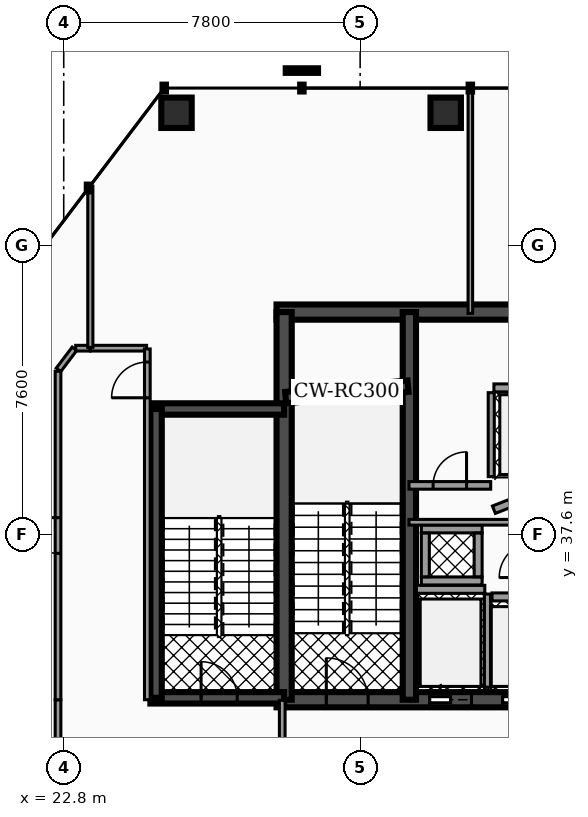
"""IFC4 building model, lengths in metres.
Left out: names, types, materials, properties, quantities, classifications, styles, units other than length and angle.
Written with IfcOpenShell. Run it as: python <this file> out.ifc"""

import sys

from ifc_helpers import new_model, si_unit, direction, frame, frame_2d, origin, origin_2d, place, context, subcontext, project, spatial, rectangle, hollow_rectangle, extrude, element, fill, save


model = new_model("IFC4")
c1 = context("Model", 3, precision=1e-05, world=origin(), true_north=direction((0.0, 1.0)))
c2 = subcontext(c1, "Body", "Model", "MODEL_VIEW")
j1 = project(units=[si_unit("LENGTHUNIT", "METRE"), si_unit("PLANEANGLEUNIT", "RADIAN")], contexts=[c1])
p1 = place(None, origin())
s1 = spatial("IfcSite", under=j1, at=p1, CompositionType="ELEMENT")
p2 = place(p1, origin())
s2 = spatial("IfcBuilding", under=s1, at=p2, CompositionType="ELEMENT")
p3 = place(p2, frame((0.0, 0.0, 119.0)))
s3 = spatial("IfcBuildingStorey", under=s2, at=p3, CompositionType="ELEMENT", Elevation=119.0)
p4 = place(p3, frame((28.4, 43.45, 0.0), z_axis=(0.0, 0.0, 1.0), x_axis=(1.0, 0.0, 0.0)))
e1 = element("IfcWall", 1, at=p4, inside=s3, PredefinedType="SHEAR", context=c2, shape_type="SweptSolid", body=[
    extrude(rectangle(XDim=20.06, YDim=0.4, at=frame_2d((10.03, 0.0))), origin(), (0.0, 0.0, 1.0), 4.18),
])
p5 = place(p3, frame((28.4, 33.25, 0.0), z_axis=(0.0, 0.0, 1.0), x_axis=(1.0, 0.0, 0.0)))
e2 = element("IfcWall", 2, at=p5, inside=s3, PredefinedType="SHEAR", context=c2, shape_type="SweptSolid", body=[
    extrude(rectangle(XDim=20.06, YDim=0.4, at=frame_2d((10.03, 0.0))), origin(), (0.0, 0.0, 1.0), 4.18),
])
p6 = place(p5, frame((4.03, 0.0, 0.0)))
e3 = element("IfcOpeningElement", 3, at=p6, cuts=e2, PredefinedType="OPENING", context=c2, shape_type="SweptSolid", body=[
    extrude(rectangle(XDim=1.1, YDim=2.15, at=frame_2d((0.55, 1.075))), frame((0.0, 0.21, 0.0), z_axis=(0.0, -1.0, 0.0), x_axis=(1.0, 0.0, 0.0)), (0.0, 0.0, 1.0), 0.42),
])
p7 = place(p5, frame((14.87, 0.0, 0.0)))
e4 = element("IfcOpeningElement", 4, at=p7, cuts=e2, PredefinedType="OPENING", context=c2, shape_type="SweptSolid", body=[
    extrude(rectangle(XDim=1.1, YDim=2.15, at=frame_2d((0.55, 1.075))), frame((0.0, 0.21, 0.0), z_axis=(0.0, -1.0, 0.0), x_axis=(1.0, 0.0, 0.0)), (0.0, 0.0, 1.0), 0.42),
])
p8 = place(p5, frame((5.95, 0.0, 0.0)))
e5 = element("IfcOpeningElement", 5, at=p8, cuts=e2, PredefinedType="OPENING", context=c2, shape_type="SweptSolid", body=[
    extrude(rectangle(XDim=1.0, YDim=2.1, at=frame_2d((0.5, 1.05))), frame((0.0, 0.21, 0.0), z_axis=(0.0, -1.0, 0.0), x_axis=(1.0, 0.0, 0.0)), (0.0, 0.0, 1.0), 0.42),
])
p9 = place(p5, frame((7.65, 0.0, 0.0)))
e6 = element("IfcOpeningElement", 6, at=p9, cuts=e2, PredefinedType="OPENING", context=c2, shape_type="SweptSolid", body=[
    extrude(rectangle(XDim=1.0, YDim=2.1, at=frame_2d((0.5, 1.05))), frame((0.0, 0.21, 0.0), z_axis=(0.0, -1.0, 0.0), x_axis=(1.0, 0.0, 0.0)), (0.0, 0.0, 1.0), 0.42),
])
p10 = place(p5, frame((1.31, 0.0, 0.0)))
e7 = element("IfcOpeningElement", 7, at=p10, cuts=e2, PredefinedType="OPENING", context=c2, shape_type="SweptSolid", body=[
    extrude(rectangle(XDim=1.1, YDim=2.2, at=frame_2d((0.55, 1.1))), frame((0.0, 0.21, 0.0), z_axis=(0.0, -1.0, 0.0), x_axis=(1.0, 0.0, 0.0)), (0.0, 0.0, 1.0), 0.42),
])
p11 = place(p5, frame((9.44, 0.0, 0.0)))
e8 = element("IfcOpeningElement", 8, at=p11, cuts=e2, PredefinedType="OPENING", context=c2, shape_type="SweptSolid", body=[
    extrude(rectangle(XDim=1.12, YDim=2.05, at=frame_2d((0.56, 1.025))), frame((0.0, 0.21, 0.0), z_axis=(0.0, -1.0, 0.0), x_axis=(1.0, 0.0, 0.0)), (0.0, 0.0, 1.0), 0.42),
])
p12 = place(p5, frame((17.65, 0.0, 0.0)))
e9 = element("IfcOpeningElement", 9, at=p12, cuts=e2, PredefinedType="OPENING", context=c2, shape_type="SweptSolid", body=[
    extrude(rectangle(XDim=1.1, YDim=2.2, at=frame_2d((0.55, 1.1))), frame((0.0, 0.21, 0.0), z_axis=(0.0, -1.0, 0.0), x_axis=(1.0, 0.0, 0.0)), (0.0, 0.0, 1.0), 0.42),
])
p13 = place(p3, frame((28.6, 33.25, 0.0), z_axis=(0.0, 0.0, 1.0), x_axis=(0.0, 1.0, 0.0)))
e10 = element("IfcWall", 10, at=p13, inside=s3, PredefinedType="SHEAR", context=c2, shape_type="SweptSolid", body=[
    extrude(rectangle(XDim=10.2, YDim=0.4, at=frame_2d((5.1, 0.0))), origin(), (0.0, 0.0, 1.0), 4.18),
])
p14 = place(p3, frame((31.895, 33.25, 0.0), z_axis=(0.0, 0.0, 1.0), x_axis=(0.0, 1.0, 0.0)))
e11 = element("IfcWall", 11, at=p14, inside=s3, PredefinedType="SHEAR", context=c2, shape_type="SweptSolid", body=[
    extrude(rectangle(XDim=10.2, YDim=0.35, at=frame_2d((5.1, 0.0))), origin(), (0.0, 0.0, 1.0), 4.18),
])
p15 = place(p3, frame((28.64, 41.2, 0.0), z_axis=(0.0, 0.0, 1.0), x_axis=(0.995687118776, 0.092774789157, 0.0)))
e12 = element("IfcWall", 12, at=p15, inside=s3, PredefinedType="SHEAR", context=c2, shape_type="SweptSolid", body=[
    extrude(rectangle(XDim=3.234, YDim=0.3, at=frame_2d((1.617, 0.0))), origin(), (0.0, 0.0, 1.0), 4.18),
])
p16 = place(p3, frame((25.08, 40.9, 0.0), z_axis=(0.0, 0.0, 1.0), x_axis=(1.0, 0.0, 0.0)))
e13 = element("IfcWall", 13, at=p16, inside=s3, PredefinedType="SHEAR", context=c2, shape_type="SweptSolid", body=[
    extrude(rectangle(XDim=3.52, YDim=0.3, at=frame_2d((1.76, 0.0))), origin(), (0.0, 0.0, 1.0), 4.18),
])
p17 = place(p3, frame((25.08, 33.3, 0.0), z_axis=(0.0, 0.0, 1.0), x_axis=(1.0, 0.0, 0.0)))
e14 = element("IfcWall", 14, at=p17, inside=s3, PredefinedType="SHEAR", context=c2, shape_type="SweptSolid", body=[
    extrude(rectangle(XDim=3.52, YDim=0.3, at=frame_2d((1.76, 0.0))), origin(), (0.0, 0.0, 1.0), 4.18),
])
p18 = place(p17, frame((1.335, 0.0, 0.0)))
e15 = element("IfcOpeningElement", 15, at=p18, cuts=e14, PredefinedType="OPENING", context=c2, shape_type="SweptSolid", body=[
    extrude(rectangle(XDim=0.95, YDim=2.2, at=frame_2d((0.475, 1.1))), frame((0.0, 0.16, 0.0), z_axis=(0.0, -1.0, 0.0), x_axis=(1.0, 0.0, 0.0)), (0.0, 0.0, 1.0), 0.32),
])
p19 = place(p3, frame((25.23, 33.3, 0.0), z_axis=(0.0, 0.0, 1.0), x_axis=(0.0, 1.0, 0.0)))
e16 = element("IfcWall", 16, at=p19, inside=s3, PredefinedType="SHEAR", context=c2, shape_type="SweptSolid", body=[
    extrude(rectangle(XDim=7.6, YDim=0.3, at=frame_2d((3.8, 0.0))), origin(), (0.0, 0.0, 1.0), 4.18),
])
p20 = place(p3, frame((32.851, 48.694, 0.0), z_axis=(-0.044280402456, -0.018552263479, 0.998846864879), x_axis=(0.386426625093, -0.922320152344, 0.0)))
e17 = element("IfcColumn", 17, at=p20, inside=s3, PredefinedType="COLUMN", context=c2, shape_type="SweptSolid", body=[
    extrude(hollow_rectangle(XDim=0.8, YDim=0.8, WallThickness=0.04, at=origin_2d()), origin(), (0.0, 0.0, 1.0), 4.185),
])
p21 = place(p3, frame((25.767, 48.694, 0.0), z_axis=(-0.083623610974, -0.018505433744, 0.996325569585), x_axis=(0.216067063964, -0.976378524892, 0.0)))
e18 = element("IfcColumn", 18, at=p21, inside=s3, PredefinedType="COLUMN", context=c2, shape_type="SweptSolid", body=[
    extrude(hollow_rectangle(XDim=0.8, YDim=0.8, WallThickness=0.04, at=origin_2d()), origin(), (0.0, 0.0, 1.0), 4.195),
])
p22 = place(p3, frame((32.08, 36.155, 0.0), z_axis=(0.0, 0.0, 1.0), x_axis=(1.0, 0.0, 0.0)))
e19 = element("IfcWall", 19, at=p22, inside=s3, PredefinedType="SOLIDWALL", context=c2, shape_type="SweptSolid", body=[
    extrude(rectangle(XDim=1.8, YDim=0.21, at=frame_2d((0.9, 0.0))), origin(), (0.0, 0.0, 1.0), 3.152),
])
p23 = place(p3, frame((33.95, 33.58, 0.0), z_axis=(0.0, 0.0, 1.0), x_axis=(0.0, 1.0, 0.0)))
e20 = element("IfcWall", 20, at=p23, inside=s3, PredefinedType="SOLIDWALL", context=c2, shape_type="SweptSolid", body=[
    extrude(rectangle(XDim=2.45, YDim=0.16, at=frame_2d((1.225, 0.0))), origin(), (0.0, 0.0, 1.0), 3.152),
])
p24 = place(p3, frame((34.07, 35.955, 0.0), z_axis=(0.0, 0.0, 1.0), x_axis=(1.0, 0.0, 0.0)))
e21 = element("IfcWall", 21, at=p24, inside=s3, PredefinedType="SOLIDWALL", context=c2, shape_type="SweptSolid", body=[
    extrude(rectangle(XDim=1.56, YDim=0.21, at=frame_2d((0.78, 0.0))), origin(), (0.0, 0.0, 1.0), 3.152),
])
p25 = place(p3, frame((34.12, 38.25, 0.0), z_axis=(0.0, 0.0, 1.0), x_axis=(0.930804993012, 0.36551616241, 0.0)))
e22 = element("IfcWall", 22, at=p25, inside=s3, PredefinedType="SOLIDWALL", context=c2, shape_type="SweptSolid", body=[
    extrude(rectangle(XDim=2.052, YDim=0.21, at=frame_2d((1.026, 0.0))), origin(), (0.0, 0.0, 1.0), 3.152),
])
p26 = place(p25, frame((0.455, 0.0, 0.0)))
e23 = element("IfcOpeningElement", 23, at=p26, cuts=e22, PredefinedType="OPENING", context=c2, shape_type="SweptSolid", body=[
    extrude(rectangle(XDim=1.0, YDim=2.1, at=frame_2d((0.5, 1.05))), frame((0.0, 0.115, 0.0), z_axis=(0.0, -1.0, 0.0), x_axis=(1.0, 0.0, 0.0)), (0.0, 0.0, 1.0), 0.23),
])
p27 = place(p3, frame((34.12, 41.455, 0.0), z_axis=(0.0, 0.0, 1.0), x_axis=(1.0, 0.0, 0.0)))
e24 = element("IfcWall", 24, at=p27, inside=s3, PredefinedType="SOLIDWALL", context=c2, shape_type="SweptSolid", body=[
    extrude(rectangle(XDim=1.91, YDim=0.21, at=frame_2d((0.955, 0.0))), origin(), (0.0, 0.0, 1.0), 3.152),
])
p28 = place(p3, frame((34.05, 39.12, 0.0), z_axis=(0.0, 0.0, 1.0), x_axis=(0.0, 1.0, 0.0)))
e25 = element("IfcWall", 25, at=p28, inside=s3, PredefinedType="SOLIDWALL", context=c2, shape_type="SweptSolid", body=[
    extrude(rectangle(XDim=2.21, YDim=0.16, at=frame_2d((1.105, 0.0))), origin(), (0.0, 0.0, 1.0), 3.152),
])
for number, where, z_axis, x_axis in (
    (26, (32.21, 36.375, 0.0), (0.0, 0.0, 1.0), (1.0, 0.0, 0.0)),
    (27, (32.21, 37.745, 0.0), (0.0, 0.0, 1.0), (1.0, 0.0, 0.0)),
):
    element("IfcWall", number, at=place(p3, frame(where, z_axis=z_axis, x_axis=x_axis)), inside=s3, PredefinedType="SOLIDWALL", context=c2, shape_type="SweptSolid", body=[
        extrude(rectangle(XDim=1.6, YDim=0.21, at=frame_2d((0.8, 0.0))), origin(), (0.0, 0.0, 1.0), 4.18),
    ])
for number, where, z_axis, x_axis in (
    (28, (32.315, 36.485, 0.0), (0.0, 0.0, 1.0), (0.0, 1.0, 0.0)),
    (29, (33.705, 36.485, 0.0), (0.0, 0.0, 1.0), (0.0, 1.0, 0.0)),
):
    element("IfcWall", number, at=place(p3, frame(where, z_axis=z_axis, x_axis=x_axis)), inside=s3, PredefinedType="SOLIDWALL", context=c2, shape_type="SweptSolid", body=[
        extrude(rectangle(XDim=1.15, YDim=0.21, at=frame_2d((0.575, 0.0))), origin(), (0.0, 0.0, 1.0), 4.18),
    ])
p29 = place(p3, frame((31.885, 37.92, 0.0), z_axis=(0.0, 0.0, 1.0), x_axis=(1.0, 0.0, 0.0)))
e30 = element("IfcWall", 30, at=p29, inside=s3, PredefinedType="PARTITIONING", context=c2, shape_type="SweptSolid", body=[
    extrude(rectangle(XDim=3.295, YDim=0.15, at=frame_2d((1.647, 0.0))), origin(), (0.0, 0.0, 1.0), 3.137),
])
p30 = place(p3, frame((31.885, 38.89, 0.0), z_axis=(0.0, 0.0, 1.0), x_axis=(1.0, 0.0, 0.0)))
e31 = element("IfcWall", 31, at=p30, inside=s3, PredefinedType="PARTITIONING", context=c2, shape_type="SweptSolid", body=[
    extrude(rectangle(XDim=2.15, YDim=0.2, at=frame_2d((1.075, 0.0))), origin(), (0.0, 0.0, 1.0), 3.137),
])
p31 = place(p30, frame((0.635, 0.0, 0.0)))
e32 = element("IfcOpeningElement", 32, at=p31, cuts=e31, PredefinedType="OPENING", context=c2, shape_type="SweptSolid", body=[
    extrude(rectangle(XDim=0.88, YDim=2.05, at=frame_2d((0.44, 1.025))), frame((0.0, 0.11, 0.0), z_axis=(0.0, -1.0, 0.0), x_axis=(1.0, 0.0, 0.0)), (0.0, 0.0, 1.0), 0.22),
])
p32 = place(p3, frame((28.55, 30.17, 0.0), z_axis=(0.0, 0.0, 1.0), x_axis=(0.0, 1.0, 0.0)))
e33 = element("IfcWall", 33, at=p32, inside=s3, PredefinedType="PARTITIONING", context=c2, shape_type="SweptSolid", body=[
    extrude(rectangle(XDim=3.065, YDim=0.15, at=frame_2d((1.533, 0.0))), origin(), (0.0, 0.0, 1.0), 3.137),
])
p33 = place(p32, frame((1.062, 0.0, 0.0)))
e34 = element("IfcOpeningElement", 34, at=p33, cuts=e33, PredefinedType="OPENING", context=c2, shape_type="SweptSolid", body=[
    extrude(rectangle(XDim=0.94, YDim=2.05, at=frame_2d((0.47, 1.025))), frame((0.0, 0.085, 0.0), z_axis=(0.0, -1.0, 0.0), x_axis=(1.0, 0.0, 0.0)), (0.0, 0.0, 1.0), 0.17),
])
p34 = place(p3, frame((22.65, 30.777, 0.0), z_axis=(0.0, 0.0, 1.0), x_axis=(0.0, 1.0, 0.0)))
e35 = element("IfcWall", 35, at=p34, inside=s3, PredefinedType="PARTITIONING", context=c2, shape_type="SweptSolid", body=[
    extrude(rectangle(XDim=2.473, YDim=0.15, at=frame_2d((1.236, 0.0))), origin(), (0.0, 0.0, 1.0), 3.137),
])
p35 = place(p3, frame((22.65, 33.25, 0.0), z_axis=(0.0, 0.0, 1.0), x_axis=(0.0, 1.0, 0.0)))
e36 = element("IfcWall", 36, at=p35, inside=s3, PredefinedType="PARTITIONING", context=c2, shape_type="SweptSolid", body=[
    extrude(rectangle(XDim=8.643, YDim=0.15, at=frame_2d((4.322, 0.0))), origin(), (0.0, 0.0, 1.0), 3.137),
])
p36 = place(p35, frame((3.852, 0.0, 0.0)))
e37 = element("IfcOpeningElement", 37, at=p36, cuts=e36, PredefinedType="OPENING", context=c2, shape_type="SweptSolid", body=[
    extrude(rectangle(XDim=0.94, YDim=2.05, at=frame_2d((0.47, 1.025))), frame((0.0, 0.085, 0.0), z_axis=(0.0, -1.0, 0.0), x_axis=(1.0, 0.0, 0.0)), (0.0, 0.0, 1.0), 0.17),
])
p37 = place(p3, frame((22.662, 41.929, 0.0), z_axis=(0.0, 0.0, 1.0), x_axis=(0.603864439616, 0.797087033245, 0.0)))
e38 = element("IfcWall", 38, at=p37, inside=s3, PredefinedType="PARTITIONING", context=c2, shape_type="SweptSolid", body=[
    extrude(rectangle(XDim=0.696, YDim=0.15, at=frame_2d((0.348, 0.0))), origin(), (0.0, 0.0, 1.0), 3.137),
])
p38 = place(p3, frame((23.115, 42.5, 0.0), z_axis=(0.0, 0.0, 1.0), x_axis=(1.0, 0.0, 0.0)))
e39 = element("IfcWall", 39, at=p38, inside=s3, PredefinedType="PARTITIONING", context=c2, shape_type="SweptSolid", body=[
    extrude(rectangle(XDim=0.381, YDim=0.15, at=frame_2d((0.19, 0.0))), origin(), (0.0, 0.0, 1.0), 3.137),
])
p39 = place(p3, frame((23.505, 42.5, 0.0), z_axis=(0.0, 0.0, 1.0), x_axis=(1.0, 0.0, 0.0)))
e40 = element("IfcWall", 40, at=p39, inside=s3, PredefinedType="PARTITIONING", context=c2, shape_type="SweptSolid", body=[
    extrude(rectangle(XDim=1.475, YDim=0.15, at=frame_2d((0.738, 0.0))), origin(), (0.0, 0.0, 1.0), 3.137),
])
p40 = place(p3, frame((25.0, 33.25, 0.0), z_axis=(0.0, 0.0, 1.0), x_axis=(0.0, 1.0, 0.0)))
e41 = element("IfcWall", 41, at=p40, inside=s3, PredefinedType="PARTITIONING", context=c2, shape_type="SweptSolid", body=[
    extrude(rectangle(XDim=9.23, YDim=0.15, at=frame_2d((4.615, 0.0))), origin(), (0.0, 0.0, 1.0), 3.137),
])
p41 = place(p40, frame((7.945, 0.0, 0.0)))
e42 = element("IfcOpeningElement", 42, at=p41, cuts=e41, PredefinedType="OPENING", context=c2, shape_type="SweptSolid", body=[
    extrude(rectangle(XDim=0.94, YDim=2.05, at=frame_2d((0.47, 1.025))), frame((0.0, 0.085, 0.0), z_axis=(0.0, -1.0, 0.0), x_axis=(1.0, 0.0, 0.0)), (0.0, 0.0, 1.0), 0.17),
])
p42 = place(p3, frame((33.5, 43.415, 0.0), z_axis=(0.0, 0.0, 1.0), x_axis=(0.0, 1.0, 0.0)))
e43 = element("IfcWall", 43, at=p42, inside=s3, PredefinedType="PARTITIONING", context=c2, shape_type="SweptSolid", body=[
    extrude(rectangle(XDim=5.914, YDim=0.12, at=frame_2d((2.957, 0.0))), origin(), (0.0, 0.0, 1.0), 3.137),
])
p43 = place(p3, frame((23.5, 42.52, 0.0), z_axis=(0.0, 0.0, 1.0), x_axis=(0.0, 1.0, 0.0)))
e44 = element("IfcWall", 44, at=p43, inside=s3, PredefinedType="PARTITIONING", context=c2, shape_type="SweptSolid", body=[
    extrude(rectangle(XDim=4.243, YDim=0.135, at=frame_2d((2.121, 0.0))), origin(), (0.0, 0.0, 1.0), 3.137),
])
p44 = place(p6, origin())
e45 = element("IfcDoor", 45, at=p44, inside=s3, OperationType="SLIDING_TO_LEFT", PredefinedType="DOOR", context=c2, shape_type="SweptSolid", body=[
    extrude(rectangle(XDim=1.1, YDim=2.15, at=frame_2d((0.55, 1.075))), frame((0.0, 0.025, 0.0), z_axis=(0.0, -1.0, 0.0), x_axis=(1.0, 0.0, 0.0)), (0.0, 0.0, 1.0), 0.05),
])
fill(e3, e45)
p45 = place(p8, origin())
e46 = element("IfcDoor", 46, at=p45, inside=s3, OperationType="SLIDING_TO_LEFT", PredefinedType="DOOR", context=c2, shape_type="SweptSolid", body=[
    extrude(rectangle(XDim=1.0, YDim=2.1, at=frame_2d((0.5, 1.05))), frame((0.0, 0.025, 0.0), z_axis=(0.0, -1.0, 0.0), x_axis=(1.0, 0.0, 0.0)), (0.0, 0.0, 1.0), 0.05),
])
fill(e5, e46)
p46 = place(p10, origin())
e47 = element("IfcDoor", 47, at=p46, inside=s3, OperationType="SINGLE_SWING_LEFT", PredefinedType="DOOR", context=c2, shape_type="SweptSolid", body=[
    extrude(rectangle(XDim=1.1, YDim=2.2, at=frame_2d((0.55, 1.1))), frame((0.0, 0.025, 0.0), z_axis=(0.0, -1.0, 0.0), x_axis=(1.0, 0.0, 0.0)), (0.0, 0.0, 1.0), 0.05),
])
fill(e7, e47)
p47 = place(p18, origin())
e48 = element("IfcDoor", 48, at=p47, inside=s3, OperationType="SINGLE_SWING_LEFT", PredefinedType="DOOR", context=c2, shape_type="SweptSolid", body=[
    extrude(rectangle(XDim=0.95, YDim=2.2, at=frame_2d((0.475, 1.1))), frame((0.0, 0.025, 0.0), z_axis=(0.0, -1.0, 0.0), x_axis=(1.0, 0.0, 0.0)), (0.0, 0.0, 1.0), 0.05),
])
fill(e15, e48)
p48 = place(p31, origin())
e49 = element("IfcDoor", 49, at=p48, inside=s3, OperationType="SINGLE_SWING_RIGHT", PredefinedType="DOOR", context=c2, shape_type="SweptSolid", body=[
    extrude(rectangle(XDim=0.88, YDim=2.05, at=frame_2d((0.44, 1.025))), frame((0.0, 0.025, 0.0), z_axis=(0.0, -1.0, 0.0), x_axis=(1.0, 0.0, 0.0)), (0.0, 0.0, 1.0), 0.05),
])
fill(e32, e49)
p49 = place(p36, origin())
e50 = element("IfcDoor", 50, at=p49, inside=s3, OperationType="SINGLE_SWING_RIGHT", PredefinedType="DOOR", context=c2, shape_type="SweptSolid", body=[
    extrude(rectangle(XDim=0.94, YDim=2.05, at=frame_2d((0.47, 1.025))), frame((0.0, 0.025, 0.0), z_axis=(0.0, -1.0, 0.0), x_axis=(1.0, 0.0, 0.0)), (0.0, 0.0, 1.0), 0.05),
])
fill(e37, e50)
p50 = place(p41, origin())
e51 = element("IfcDoor", 51, at=p50, inside=s3, OperationType="SINGLE_SWING_LEFT", PredefinedType="DOOR", context=c2, shape_type="SweptSolid", body=[
    extrude(rectangle(XDim=0.94, YDim=2.05, at=frame_2d((0.47, 1.025))), frame((0.0, 0.025, 0.0), z_axis=(0.0, -1.0, 0.0), x_axis=(1.0, 0.0, 0.0)), (0.0, 0.0, 1.0), 0.05),
])
fill(e42, e51)
save(model, sys.argv[1])
